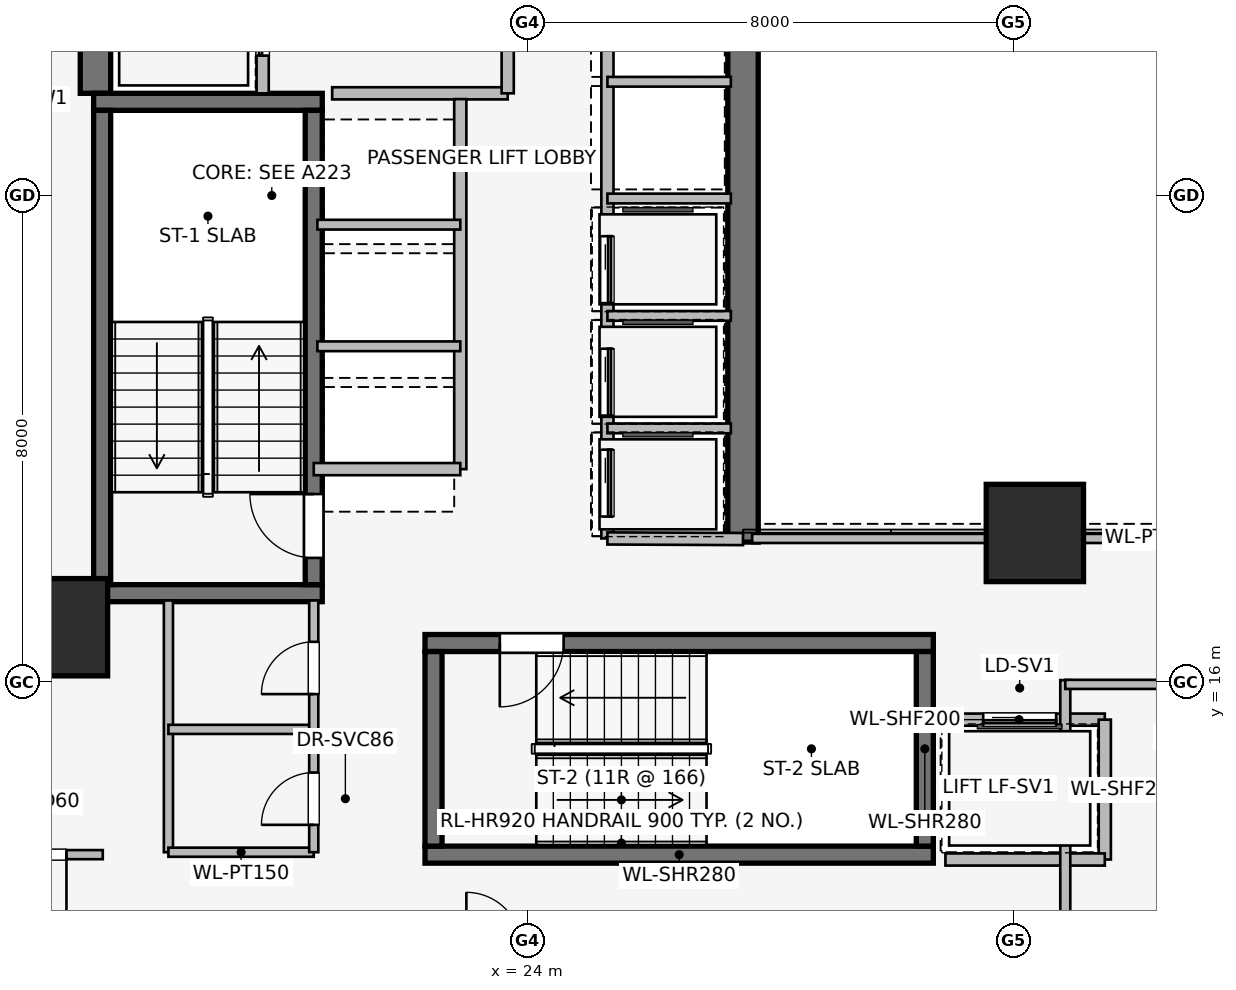
"""IFC4 building model, lengths in metres.
Left out: names, types, materials, properties, quantities, classifications, styles, units other than length and angle.
Written with IfcOpenShell. Run it as: python <this file> out.ifc"""

import sys

from ifc_helpers import new_model, si_unit, direction, frame, frame_2d, origin, origin_2d, place, context, subcontext, project, spatial, rectangle, extrude, element, fill, save


model = new_model("IFC4")
c1 = context("Model", 3, precision=1e-05, world=origin(), true_north=direction((0.0, 1.0)))
c2 = subcontext(c1, "Body", "Model", "MODEL_VIEW")
j1 = project(units=[si_unit("LENGTHUNIT", "METRE"), si_unit("PLANEANGLEUNIT", "RADIAN")], contexts=[c1])
p1 = place(None, origin())
s1 = spatial("IfcSite", under=j1, at=p1, CompositionType="ELEMENT")
p2 = place(p1, origin())
s2 = spatial("IfcBuilding", under=s1, at=p2, CompositionType="ELEMENT")
p3 = place(p2, frame((0.0, 0.0, 81.75)))
s3 = spatial("IfcBuildingStorey", under=s2, at=p3, CompositionType="ELEMENT", Elevation=81.75)
p4 = place(p3, frame((16.9, 25.68, 0.0), z_axis=(0.0, 0.0, 1.0), x_axis=(0.0, 1.0, 0.0)))
e1 = element("IfcWall", 1, at=p4, inside=s3, PredefinedType="SHEAR", context=c2, shape_type="SweptSolid", body=[
    extrude(rectangle(XDim=5.62, YDim=0.5, at=frame_2d((2.81, 0.0))), origin(), (0.0, 0.0, 1.0), 3.65),
])
p5 = place(p3, frame((27.55, 29.55, 0.0), z_axis=(0.0, 0.0, 1.0), x_axis=(0.0, -1.0, 0.0)))
e2 = element("IfcWall", 2, at=p5, inside=s3, PredefinedType="SHEAR", context=c2, shape_type="SweptSolid", body=[
    extrude(rectangle(XDim=11.25, YDim=0.5, at=frame_2d((5.625, 0.0))), origin(), (0.0, 0.0, 1.0), 3.65),
])
for number, where, z_axis, x_axis in (
    (3, (16.87, 17.46, 0.0), (0.0, 0.0, 1.0), (1.0, 0.0, 0.0)),
    (4, (20.63, 25.54, 0.0), (0.0, 0.0, 1.0), (-1.0, 0.0, 0.0)),
):
    element("IfcWall", number, at=place(p3, frame(where, z_axis=z_axis, x_axis=x_axis)), inside=s3, PredefinedType="SHEAR", context=c2, shape_type="SweptSolid", body=[
        extrude(rectangle(XDim=3.76, YDim=0.28, at=frame_2d((1.88, 0.0))), origin(), (0.0, 0.0, 1.0), 3.65),
    ])
p6 = place(p3, frame((17.01, 25.4, 0.0), z_axis=(0.0, 0.0, 1.0), x_axis=(0.0, -1.0, 0.0)))
e5 = element("IfcWall", 5, at=p6, inside=s3, PredefinedType="SHEAR", context=c2, shape_type="SweptSolid", body=[
    extrude(rectangle(XDim=7.8, YDim=0.28, at=frame_2d((3.9, 0.0))), origin(), (0.0, 0.0, 1.0), 3.65),
])
p7 = place(p3, frame((20.49, 17.6, 0.0), z_axis=(0.0, 0.0, 1.0), x_axis=(0.0, 1.0, 0.0)))
e6 = element("IfcWall", 6, at=p7, inside=s3, PredefinedType="SHEAR", context=c2, shape_type="SweptSolid", body=[
    extrude(rectangle(XDim=7.8, YDim=0.28, at=frame_2d((3.9, 0.0))), origin(), (0.0, 0.0, 1.0), 3.65),
])
p8 = place(p7, frame((0.44, 0.0, 0.0)))
e7 = element("IfcOpeningElement", 7, at=p8, cuts=e6, PredefinedType="OPENING", context=c2, shape_type="SweptSolid", body=[
    extrude(rectangle(XDim=1.05, YDim=2.0, at=frame_2d((0.525, 1.0))), frame((0.0, 0.15, 0.0), z_axis=(0.0, -1.0, 0.0), x_axis=(1.0, 0.0, 0.0)), (0.0, 0.0, 1.0), 0.3),
])
p9 = place(p3, frame((22.32, 13.16, 0.0), z_axis=(0.0, 0.0, 1.0), x_axis=(1.0, 0.0, 0.0)))
e8 = element("IfcWall", 8, at=p9, inside=s3, PredefinedType="SHEAR", context=c2, shape_type="SweptSolid", body=[
    extrude(rectangle(XDim=8.36, YDim=0.28, at=frame_2d((4.18, 0.0))), origin(), (0.0, 0.0, 1.0), 3.65),
])
p10 = place(p3, frame((30.68, 16.64, 0.0), z_axis=(0.0, 0.0, 1.0), x_axis=(-1.0, 0.0, 0.0)))
e9 = element("IfcWall", 9, at=p10, inside=s3, PredefinedType="SHEAR", context=c2, shape_type="SweptSolid", body=[
    extrude(rectangle(XDim=8.36, YDim=0.28, at=frame_2d((4.18, 0.0))), origin(), (0.0, 0.0, 1.0), 3.65),
])
p11 = place(p10, frame((6.08, 0.0, 0.0)))
e10 = element("IfcOpeningElement", 10, at=p11, cuts=e9, PredefinedType="OPENING", context=c2, shape_type="SweptSolid", body=[
    extrude(rectangle(XDim=1.05, YDim=2.0, at=frame_2d((0.525, 1.0))), frame((0.0, 0.15, 0.0), z_axis=(0.0, -1.0, 0.0), x_axis=(1.0, 0.0, 0.0)), (0.0, 0.0, 1.0), 0.3),
])
for number, where, z_axis, x_axis in (
    (11, (22.46, 16.5, 0.0), (0.0, 0.0, 1.0), (0.0, -1.0, 0.0)),
    (12, (30.54, 13.3, 0.0), (0.0, 0.0, 1.0), (0.0, 1.0, 0.0)),
):
    element("IfcWall", number, at=place(p3, frame(where, z_axis=z_axis, x_axis=x_axis)), inside=s3, PredefinedType="SHEAR", context=c2, shape_type="SweptSolid", body=[
        extrude(rectangle(XDim=3.2, YDim=0.28, at=frame_2d((1.6, 0.0))), origin(), (0.0, 0.0, 1.0), 3.65),
    ])
for number, where, z_axis, x_axis in (
    (13, (16.3, 16.9, 0.0), (0.0, 0.0, 1.0), (1.0, 0.0, 0.0)),
    (14, (32.35, 18.45, 0.0), (0.0, 0.0, 1.0), (1.0, 0.0, 0.0)),
):
    element("IfcColumn", number, at=place(p3, frame(where, z_axis=z_axis, x_axis=x_axis)), inside=s3, PredefinedType="COLUMN", context=c2, shape_type="SweptSolid", body=[
        extrude(rectangle(XDim=1.6, YDim=1.6, at=origin_2d()), origin(), (0.0, 0.0, 1.0), 3.65),
    ])
p12 = place(p3, frame((16.998, 11.099, 0.0), z_axis=(0.0, 0.0, 1.0), x_axis=(-0.790691856293, 0.61221433207, 0.0)))
e15 = element("IfcWall", 15, at=p12, inside=s3, PredefinedType="STANDARD", context=c2, shape_type="SweptSolid", body=[
    extrude(rectangle(XDim=1.676, YDim=0.33, at=frame_2d((0.838, 0.0))), origin(), (0.0, 0.0, 1.0), 3.39),
])
p13 = place(p3, frame((19.65, 25.68, 0.0), z_axis=(0.0, 0.0, 1.0), x_axis=(0.0, 1.0, 0.0)))
e16 = element("IfcWall", 16, at=p13, inside=s3, PredefinedType="PARTITIONING", context=c2, shape_type="SweptSolid", body=[
    extrude(rectangle(XDim=5.54, YDim=0.2, at=frame_2d((2.77, 0.0))), origin(), (0.0, 0.0, 1.0), 3.39),
])
p14 = place(p13, frame((0.62, 0.0, 0.0)))
e17 = element("IfcOpeningElement", 17, at=p14, cuts=e16, PredefinedType="OPENING", context=c2, shape_type="SweptSolid", body=[
    extrude(rectangle(XDim=1.1, YDim=2.2, at=frame_2d((0.55, 1.1))), frame((0.0, 0.11, 0.0), z_axis=(0.0, -1.0, 0.0), x_axis=(1.0, 0.0, 0.0)), (0.0, 0.0, 1.0), 0.22),
])
p15 = place(p13, frame((3.12, 0.0, 0.0)))
e18 = element("IfcOpeningElement", 18, at=p15, cuts=e16, PredefinedType="OPENING", context=c2, shape_type="SweptSolid", body=[
    extrude(rectangle(XDim=1.1, YDim=2.2, at=frame_2d((0.55, 1.1))), frame((0.0, 0.11, 0.0), z_axis=(0.0, -1.0, 0.0), x_axis=(1.0, 0.0, 0.0)), (0.0, 0.0, 1.0), 0.22),
])
p16 = place(p3, frame((20.793, 25.68, 0.0), z_axis=(0.0, 0.0, 1.0), x_axis=(1.0, 0.0, 0.0)))
e19 = element("IfcWall", 19, at=p16, inside=s3, PredefinedType="PARTITIONING", context=c2, shape_type="SweptSolid", body=[
    extrude(rectangle(XDim=2.887, YDim=0.2, at=frame_2d((1.443, 0.0))), origin(), (0.0, 0.0, 1.0), 3.39),
])
p17 = place(p3, frame((23.68, 25.68, 0.0), z_axis=(0.0, 0.0, 1.0), x_axis=(0.0, 1.0, 0.0)))
e20 = element("IfcWall", 20, at=p17, inside=s3, PredefinedType="PARTITIONING", context=c2, shape_type="SweptSolid", body=[
    extrude(rectangle(XDim=5.54, YDim=0.2, at=frame_2d((2.77, 0.0))), origin(), (0.0, 0.0, 1.0), 3.39),
])
p18 = place(p17, frame((1.8, 0.0, 0.0)))
e21 = element("IfcOpeningElement", 21, at=p18, cuts=e20, PredefinedType="OPENING", context=c2, shape_type="SweptSolid", body=[
    extrude(rectangle(XDim=1.05, YDim=2.0, at=frame_2d((0.525, 1.0))), frame((0.0, 0.11, 0.0), z_axis=(0.0, -1.0, 0.0), x_axis=(1.0, 0.0, 0.0)), (0.0, 0.0, 1.0), 0.22),
])
p19 = place(p3, frame((33.5, 15.38, 0.0), z_axis=(0.0, 0.0, 1.0), x_axis=(-1.0, 0.0, 0.0)))
e22 = element("IfcWall", 22, at=p19, inside=s3, PredefinedType="PARTITIONING", context=c2, shape_type="SweptSolid", body=[
    extrude(rectangle(XDim=2.82, YDim=0.2, at=frame_2d((1.41, 0.0))), origin(), (0.0, 0.0, 1.0), 3.39),
])
p20 = place(p19, frame((0.8, 0.0, 0.0)))
e23 = element("IfcOpeningElement", 23, at=p20, cuts=e22, PredefinedType="OPENING", context=c2, shape_type="SweptSolid", body=[
    extrude(rectangle(XDim=1.2, YDim=2.2, at=frame_2d((0.6, 1.1))), frame((0.0, 0.11, 0.0), z_axis=(0.0, -1.0, 0.0), x_axis=(1.0, 0.0, 0.0)), (0.0, 0.0, 1.0), 0.22),
])
p21 = place(p3, frame((33.5, 13.08, 0.0), z_axis=(0.0, 0.0, 1.0), x_axis=(0.0, 1.0, 0.0)))
e24 = element("IfcWall", 24, at=p21, inside=s3, PredefinedType="PARTITIONING", context=c2, shape_type="SweptSolid", body=[
    extrude(rectangle(XDim=2.3, YDim=0.2, at=frame_2d((1.15, 0.0))), origin(), (0.0, 0.0, 1.0), 3.39),
])
p22 = place(p3, frame((30.879, 13.08, 0.0), z_axis=(0.0, 0.0, 1.0), x_axis=(1.0, 0.0, 0.0)))
e25 = element("IfcWall", 25, at=p22, inside=s3, PredefinedType="PARTITIONING", context=c2, shape_type="SweptSolid", body=[
    extrude(rectangle(XDim=2.621, YDim=0.2, at=frame_2d((1.311, 0.0))), origin(), (0.0, 0.0, 1.0), 3.39),
])
p23 = place(p3, frame((22.9, 19.5, 0.0), z_axis=(0.0, 0.0, 1.0), x_axis=(0.0, 1.0, 0.0)))
e26 = element("IfcWall", 26, at=p23, inside=s3, PredefinedType="PARTITIONING", context=c2, shape_type="SweptSolid", body=[
    extrude(rectangle(XDim=6.085, YDim=0.2, at=frame_2d((3.042, 0.0))), origin(), (0.0, 0.0, 1.0), 3.39),
])
p24 = place(p3, frame((20.49, 19.5, 0.0), z_axis=(0.0, 0.0, 1.0), x_axis=(1.0, 0.0, 0.0)))
e27 = element("IfcWall", 27, at=p24, inside=s3, PredefinedType="PARTITIONING", context=c2, shape_type="SweptSolid", body=[
    extrude(rectangle(XDim=2.41, YDim=0.2, at=frame_2d((1.205, 0.0))), origin(), (0.0, 0.0, 1.0), 2.29),
])
for number, where, z_axis, x_axis in (
    (28, (20.55, 21.52, 0.0), (0.0, 0.0, 1.0), (1.0, 0.0, 0.0)),
    (29, (20.55, 23.52, 0.0), (0.0, 0.0, 1.0), (1.0, 0.0, 0.0)),
):
    element("IfcWall", number, at=place(p3, frame(where, z_axis=z_axis, x_axis=x_axis)), inside=s3, PredefinedType="PARTITIONING", context=c2, shape_type="SweptSolid", body=[
        extrude(rectangle(XDim=2.35, YDim=0.16, at=frame_2d((1.175, 0.0))), origin(), (0.0, 0.0, 1.0), 3.39),
    ])
p25 = place(p3, frame((25.32, 29.55, 0.0), z_axis=(0.0, 0.0, 1.0), x_axis=(0.0, -1.0, 0.0)))
e30 = element("IfcWall", 30, at=p25, inside=s3, PredefinedType="PARTITIONING", context=c2, shape_type="SweptSolid", body=[
    extrude(rectangle(XDim=11.19, YDim=0.2, at=frame_2d((5.595, 0.0))), origin(), (0.0, 0.0, 1.0), 3.39),
])
p26 = place(p25, frame((6.22, 0.0, 0.0)))
e31 = element("IfcOpeningElement", 31, at=p26, cuts=e30, PredefinedType="OPENING", context=c2, shape_type="SweptSolid", body=[
    extrude(rectangle(XDim=1.1, YDim=2.2, at=frame_2d((0.55, 1.1))), frame((0.0, 0.11, 0.0), z_axis=(0.0, -1.0, 0.0), x_axis=(1.0, 0.0, 0.0)), (0.0, 0.0, 1.0), 0.22),
])
p27 = place(p25, frame((8.07, 0.0, 0.0)))
e32 = element("IfcOpeningElement", 32, at=p27, cuts=e30, PredefinedType="OPENING", context=c2, shape_type="SweptSolid", body=[
    extrude(rectangle(XDim=1.1, YDim=2.2, at=frame_2d((0.55, 1.1))), frame((0.0, 0.11, 0.0), z_axis=(0.0, -1.0, 0.0), x_axis=(1.0, 0.0, 0.0)), (0.0, 0.0, 1.0), 0.22),
])
p28 = place(p25, frame((9.73, 0.0, 0.0)))
e33 = element("IfcOpeningElement", 33, at=p28, cuts=e30, PredefinedType="OPENING", context=c2, shape_type="SweptSolid", body=[
    extrude(rectangle(XDim=1.1, YDim=2.2, at=frame_2d((0.55, 1.1))), frame((0.0, 0.11, 0.0), z_axis=(0.0, -1.0, 0.0), x_axis=(1.0, 0.0, 0.0)), (0.0, 0.0, 1.0), 0.22),
])
p29 = place(p3, frame((25.32, 18.36, 0.0), z_axis=(0.0, 0.0, 1.0), x_axis=(0.999989925833, -0.004488678231, 0.0)))
e34 = element("IfcWall", 34, at=p29, inside=s3, PredefinedType="PARTITIONING", context=c2, shape_type="SweptSolid", body=[
    extrude(rectangle(XDim=2.23, YDim=0.2, at=frame_2d((1.115, 0.0))), origin(), (0.0, 0.0, 1.0), 3.39),
])
for number, where, z_axis, x_axis in (
    (35, (25.32, 20.17, 0.0), (0.0, 0.0, 1.0), (1.0, 0.0, 0.0)),
    (36, (25.32, 22.02, 0.0), (0.0, 0.0, 1.0), (1.0, 0.0, 0.0)),
    (37, (25.32, 23.95, 0.0), (0.0, 0.0, 1.0), (1.0, 0.0, 0.0)),
    (38, (25.32, 25.87, 0.0), (0.0, 0.0, 1.0), (1.0, 0.0, 0.0)),
):
    element("IfcWall", number, at=place(p3, frame(where, z_axis=z_axis, x_axis=x_axis)), inside=s3, PredefinedType="PARTITIONING", context=c2, shape_type="SweptSolid", body=[
        extrude(rectangle(XDim=2.03, YDim=0.16, at=frame_2d((1.015, 0.0))), origin(), (0.0, 0.0, 1.0), 3.39),
    ])
p30 = place(p3, frame((18.1, 17.34, 0.0), z_axis=(0.0, 0.0, 1.0), x_axis=(0.0, -1.0, 0.0)))
e39 = element("IfcWall", 39, at=p30, inside=s3, PredefinedType="PARTITIONING", context=c2, shape_type="SweptSolid", body=[
    extrude(rectangle(XDim=4.14, YDim=0.15, at=frame_2d((2.07, 0.0))), origin(), (0.0, 0.0, 1.0), 3.39),
])
for number, where, z_axis, x_axis in (
    (40, (18.1, 13.2, 0.0), (0.0, 0.0, 1.0), (1.0, 0.0, 0.0)),
    (41, (18.1, 15.22, 0.0), (0.0, 0.0, 1.0), (1.0, 0.0, 0.0)),
):
    element("IfcWall", number, at=place(p3, frame(where, z_axis=z_axis, x_axis=x_axis)), inside=s3, PredefinedType="PARTITIONING", context=c2, shape_type="SweptSolid", body=[
        extrude(rectangle(XDim=2.39, YDim=0.15, at=frame_2d((1.195, 0.0))), origin(), (0.0, 0.0, 1.0), 3.39),
    ])
p31 = place(p3, frame((20.49, 13.2, 0.0), z_axis=(0.0, 0.0, 1.0), x_axis=(0.0, 1.0, 0.0)))
e42 = element("IfcWall", 42, at=p31, inside=s3, PredefinedType="PARTITIONING", context=c2, shape_type="SweptSolid", body=[
    extrude(rectangle(XDim=4.14, YDim=0.15, at=frame_2d((2.07, 0.0))), origin(), (0.0, 0.0, 1.0), 3.39),
])
p32 = place(p31, frame((0.45, 0.0, 0.0)))
e43 = element("IfcOpeningElement", 43, at=p32, cuts=e42, PredefinedType="OPENING", context=c2, shape_type="SweptSolid", body=[
    extrude(rectangle(XDim=0.86, YDim=2.0, at=frame_2d((0.43, 1.0))), frame((0.0, 0.085, 0.0), z_axis=(0.0, -1.0, 0.0), x_axis=(1.0, 0.0, 0.0)), (0.0, 0.0, 1.0), 0.17),
])
p33 = place(p31, frame((2.6, 0.0, 0.0)))
e44 = element("IfcOpeningElement", 44, at=p33, cuts=e42, PredefinedType="OPENING", context=c2, shape_type="SweptSolid", body=[
    extrude(rectangle(XDim=0.86, YDim=2.0, at=frame_2d((0.43, 1.0))), frame((0.0, 0.085, 0.0), z_axis=(0.0, -1.0, 0.0), x_axis=(1.0, 0.0, 0.0)), (0.0, 0.0, 1.0), 0.17),
])
p34 = place(p3, frame((27.7, 18.36, 0.0), z_axis=(0.0, 0.0, 1.0), x_axis=(1.0, 0.0, 0.0)))
e45 = element("IfcWall", 45, at=p34, inside=s3, PredefinedType="PARTITIONING", context=c2, shape_type="SweptSolid", body=[
    extrude(rectangle(XDim=12.14, YDim=0.15, at=frame_2d((6.07, 0.0))), origin(), (0.0, 0.0, 1.0), 2.531),
])
p35 = place(p3, frame((32.85, 3.064, 0.0), z_axis=(0.0, 0.0, 1.0), x_axis=(0.0, 1.0, 0.0)))
e46 = element("IfcWall", 46, at=p35, inside=s3, PredefinedType="PARTITIONING", context=c2, shape_type="SweptSolid", body=[
    extrude(rectangle(XDim=12.966, YDim=0.165, at=frame_2d((6.483, 0.0))), origin(), (0.0, 0.0, 1.0), 3.39),
])
p36 = place(p3, frame((17.02, 13.16, 0.0), z_axis=(0.0, 0.0, 1.0), x_axis=(-1.0, 0.0, 0.0)))
e47 = element("IfcWall", 47, at=p36, inside=s3, PredefinedType="PARTITIONING", context=c2, shape_type="SweptSolid", body=[
    extrude(rectangle(XDim=2.12, YDim=0.15, at=frame_2d((1.06, 0.0))), origin(), (0.0, 0.0, 1.0), 3.39),
])
p37 = place(p36, frame((0.597, 0.0, 0.0)))
e48 = element("IfcOpeningElement", 48, at=p37, cuts=e47, PredefinedType="OPENING", context=c2, shape_type="SweptSolid", body=[
    extrude(rectangle(XDim=0.96, YDim=2.0, at=frame_2d((0.48, 1.0))), frame((0.0, 0.085, 0.0), z_axis=(0.0, -1.0, 0.0), x_axis=(1.0, 0.0, 0.0)), (0.0, 0.0, 1.0), 0.17),
])
p38 = place(p3, frame((32.85, 15.96, 0.0), z_axis=(0.0, 0.0, 1.0), x_axis=(1.0, 0.0, 0.0)))
e49 = element("IfcWall", 49, at=p38, inside=s3, PredefinedType="PARTITIONING", context=c2, shape_type="SweptSolid", body=[
    extrude(rectangle(XDim=4.379, YDim=0.15, at=frame_2d((2.189, 0.0))), origin(), (0.0, 0.0, 1.0), 3.39),
])
p39 = place(p38, frame((1.71, 0.0, 0.0)))
e50 = element("IfcOpeningElement", 50, at=p39, cuts=e49, PredefinedType="OPENING", context=c2, shape_type="SweptSolid", body=[
    extrude(rectangle(XDim=0.96, YDim=2.0, at=frame_2d((0.48, 1.0))), frame((0.0, 0.085, 0.0), z_axis=(0.0, -1.0, 0.0), x_axis=(1.0, 0.0, 0.0)), (0.0, 0.0, 1.0), 0.17),
])
p40 = place(p8, origin())
e51 = element("IfcDoor", 51, at=p40, inside=s3, OperationType="SINGLE_SWING_RIGHT", PredefinedType="DOOR", context=c2, shape_type="SweptSolid", body=[
    extrude(rectangle(XDim=1.05, YDim=2.0, at=frame_2d((0.525, 1.0))), frame((0.0, 0.025, 0.0), z_axis=(0.0, -1.0, 0.0), x_axis=(1.0, 0.0, 0.0)), (0.0, 0.0, 1.0), 0.05),
])
fill(e7, e51)
p41 = place(p11, origin())
e52 = element("IfcDoor", 52, at=p41, inside=s3, OperationType="SINGLE_SWING_RIGHT", PredefinedType="DOOR", context=c2, shape_type="SweptSolid", body=[
    extrude(rectangle(XDim=1.05, YDim=2.0, at=frame_2d((0.525, 1.0))), frame((0.0, 0.025, 0.0), z_axis=(0.0, -1.0, 0.0), x_axis=(1.0, 0.0, 0.0)), (0.0, 0.0, 1.0), 0.05),
])
fill(e10, e52)
p42 = place(p14, origin())
e53 = element("IfcDoor", 53, at=p42, inside=s3, OperationType="SLIDING_TO_LEFT", PredefinedType="DOOR", context=c2, shape_type="SweptSolid", body=[
    extrude(rectangle(XDim=1.1, YDim=2.2, at=frame_2d((0.55, 1.1))), frame((0.0, 0.025, 0.0), z_axis=(0.0, -1.0, 0.0), x_axis=(1.0, 0.0, 0.0)), (0.0, 0.0, 1.0), 0.05),
])
fill(e17, e53)
p43 = place(p20, origin())
e54 = element("IfcDoor", 54, at=p43, inside=s3, OperationType="SLIDING_TO_RIGHT", PredefinedType="DOOR", context=c2, shape_type="SweptSolid", body=[
    extrude(rectangle(XDim=1.2, YDim=2.2, at=frame_2d((0.6, 1.1))), frame((0.0, 0.025, 0.0), z_axis=(0.0, -1.0, 0.0), x_axis=(1.0, 0.0, 0.0)), (0.0, 0.0, 1.0), 0.05),
])
fill(e23, e54)
p44 = place(p26, origin())
e55 = element("IfcDoor", 55, at=p44, inside=s3, OperationType="SLIDING_TO_LEFT", PredefinedType="DOOR", context=c2, shape_type="SweptSolid", body=[
    extrude(rectangle(XDim=1.1, YDim=2.2, at=frame_2d((0.55, 1.1))), frame((0.0, 0.025, 0.0), z_axis=(0.0, -1.0, 0.0), x_axis=(1.0, 0.0, 0.0)), (0.0, 0.0, 1.0), 0.05),
])
fill(e31, e55)
p45 = place(p27, origin())
e56 = element("IfcDoor", 56, at=p45, inside=s3, OperationType="SLIDING_TO_LEFT", PredefinedType="DOOR", context=c2, shape_type="SweptSolid", body=[
    extrude(rectangle(XDim=1.1, YDim=2.2, at=frame_2d((0.55, 1.1))), frame((0.0, 0.025, 0.0), z_axis=(0.0, -1.0, 0.0), x_axis=(1.0, 0.0, 0.0)), (0.0, 0.0, 1.0), 0.05),
])
fill(e32, e56)
p46 = place(p28, origin())
e57 = element("IfcDoor", 57, at=p46, inside=s3, OperationType="SLIDING_TO_LEFT", PredefinedType="DOOR", context=c2, shape_type="SweptSolid", body=[
    extrude(rectangle(XDim=1.1, YDim=2.2, at=frame_2d((0.55, 1.1))), frame((0.0, 0.025, 0.0), z_axis=(0.0, -1.0, 0.0), x_axis=(1.0, 0.0, 0.0)), (0.0, 0.0, 1.0), 0.05),
])
fill(e33, e57)
p47 = place(p32, origin())
e58 = element("IfcDoor", 58, at=p47, inside=s3, OperationType="SINGLE_SWING_LEFT", PredefinedType="DOOR", context=c2, shape_type="SweptSolid", body=[
    extrude(rectangle(XDim=0.86, YDim=2.0, at=frame_2d((0.43, 1.0))), frame((0.0, 0.025, 0.0), z_axis=(0.0, -1.0, 0.0), x_axis=(1.0, 0.0, 0.0)), (0.0, 0.0, 1.0), 0.05),
])
fill(e43, e58)
p48 = place(p33, origin())
e59 = element("IfcDoor", 59, at=p48, inside=s3, OperationType="SINGLE_SWING_LEFT", PredefinedType="DOOR", context=c2, shape_type="SweptSolid", body=[
    extrude(rectangle(XDim=0.86, YDim=2.0, at=frame_2d((0.43, 1.0))), frame((0.0, 0.025, 0.0), z_axis=(0.0, -1.0, 0.0), x_axis=(1.0, 0.0, 0.0)), (0.0, 0.0, 1.0), 0.05),
])
fill(e44, e59)
p49 = place(p37, origin())
e60 = element("IfcDoor", 60, at=p49, inside=s3, OperationType="SINGLE_SWING_LEFT", PredefinedType="DOOR", context=c2, shape_type="SweptSolid", body=[
    extrude(rectangle(XDim=0.96, YDim=2.0, at=frame_2d((0.48, 1.0))), frame((0.0, 0.025, 0.0), z_axis=(0.0, -1.0, 0.0), x_axis=(1.0, 0.0, 0.0)), (0.0, 0.0, 1.0), 0.05),
])
fill(e48, e60)
save(model, sys.argv[1])
